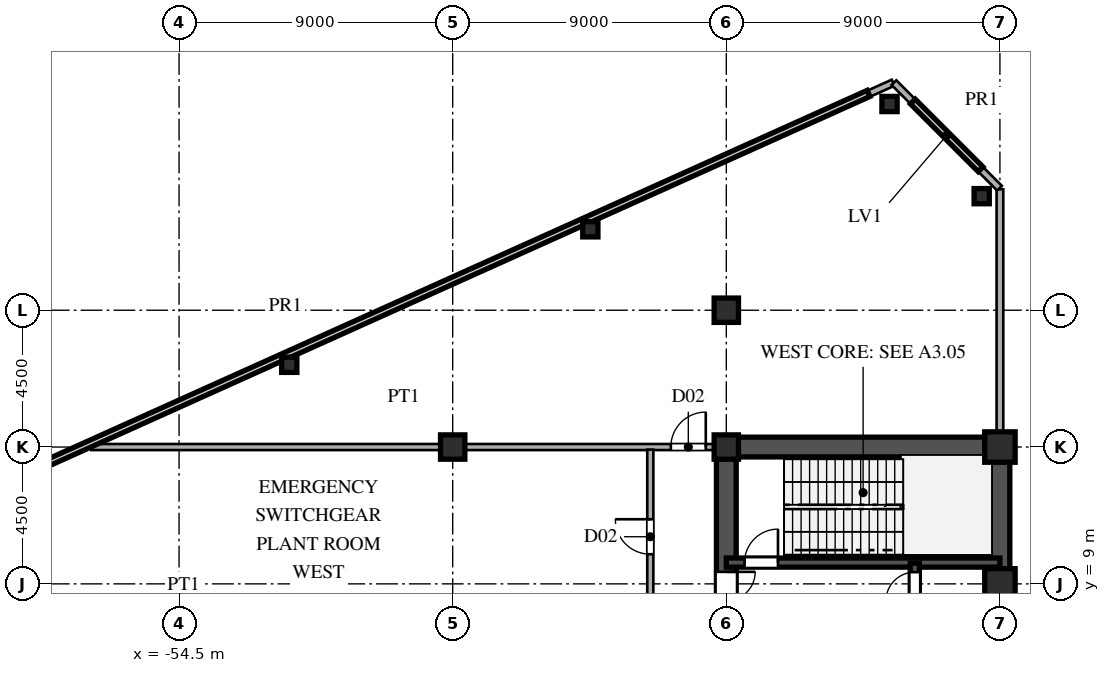
"""IFC4 building model, lengths in metres.
Left out: names, types, materials, properties, quantities, classifications, styles, units other than length and angle.
Written with IfcOpenShell. Run it as: python <this file> out.ifc"""

import sys

from ifc_helpers import new_model, si_unit, direction, frame, frame_2d, origin, origin_2d, place, context, subcontext, project, spatial, rectangle, hollow_rectangle, i_section, extrude, source, transform, mapped, element, fill, save


model = new_model("IFC4")
c1 = context("Model", 3, precision=1e-05, world=origin(), true_north=direction((0.0, 1.0)))
c2 = subcontext(c1, "Body", "Model", "MODEL_VIEW")
j1 = project(units=[si_unit("LENGTHUNIT", "METRE"), si_unit("PLANEANGLEUNIT", "RADIAN")], contexts=[c1])
p1 = place(None, origin())
s1 = spatial("IfcSite", under=j1, at=p1, CompositionType="ELEMENT")
p2 = place(p1, origin())
s2 = spatial("IfcBuilding", under=s1, at=p2, CompositionType="ELEMENT")
p3 = place(p2, frame((0.0, 0.0, 87.3)))
s3 = spatial("IfcBuildingStorey", under=s2, at=p3, CompositionType="ELEMENT", Elevation=87.3)
m1 = source(origin(), c2, "Body", "SweptSolid", [
    extrude(hollow_rectangle(XDim=1.0, YDim=1.0, WallThickness=0.042, at=origin_2d()), origin(), (0.0, 0.0, 1.0), 5.1),
])
for number, where, z_axis, x_axis in (
    (1, (-27.5, 9.0, 0.0), (0.0, 0.0, 1.0), (1.0, 0.0, 0.0)),
    (2, (-27.5, 13.5, 0.0), (0.0, 0.0, 1.0), (1.0, 0.0, 0.0)),
):
    element("IfcColumn", number, at=place(p3, frame(where, z_axis=z_axis, x_axis=x_axis)), inside=s3, PredefinedType="COLUMN", context=c2, shape_type="MappedRepresentation", body=[
        mapped(m1, transform((0.0, 0.0, 0.0), scale=1.0)),
    ])
m2 = source(origin(), c2, "Body", "SweptSolid", [
    extrude(i_section(OverallWidth=0.8, OverallDepth=0.8, WebThickness=0.032, FlangeThickness=0.05, at=origin_2d()), origin(), (0.0, 0.0, 1.0), 5.1),
])
for number, where, z_axis, x_axis in (
    (3, (-36.5, 13.5, 0.0), (0.0, 0.0, 1.0), (1.0, 0.0, 0.0)),
    (4, (-36.5, 18.0, 0.0), (0.0, 0.0, 1.0), (1.0, 0.0, 0.0)),
    (5, (-45.5, 13.5, 0.0), (0.0, 0.0, 1.0), (1.0, 0.0, 0.0)),
):
    element("IfcColumn", number, at=place(p3, frame(where, z_axis=z_axis, x_axis=x_axis)), inside=s3, PredefinedType="COLUMN", context=c2, shape_type="MappedRepresentation", body=[
        mapped(m2, transform((0.0, 0.0, 0.0), scale=1.0)),
    ])
m3 = source(origin(), c2, "Body", "SweptSolid", [
    extrude(hollow_rectangle(XDim=0.5, YDim=0.5, WallThickness=0.02, at=origin_2d()), origin(), (0.0, 0.0, 1.0), 5.1),
])
for number, where, z_axis, x_axis in (
    (6, (-28.1, 21.751, 0.0), (0.0, 0.0, 1.0), (1.0, 0.0, 0.0)),
    (7, (-31.131, 24.783, 0.0), (0.0, 0.0, 1.0), (1.0, 0.0, 0.0)),
    (8, (-40.973, 20.661, 0.0), (0.0, 0.0, 1.0), (1.0, 0.0, 0.0)),
    (9, (-50.875, 16.205, 0.0), (0.0, 0.0, 1.0), (1.0, 0.0, 0.0)),
):
    element("IfcColumn", number, at=place(p3, frame(where, z_axis=z_axis, x_axis=x_axis)), inside=s3, PredefinedType="COLUMN", context=c2, shape_type="MappedRepresentation", body=[
        mapped(m3, transform((0.0, 0.0, 0.0), scale=1.0)),
    ])
p4 = place(p3, frame((-27.5, 13.52, 0.0), z_axis=(0.0, 0.0, 1.0), x_axis=(0.0, 1.0, 0.0)))
e10 = element("IfcWall", 10, at=p4, inside=s3, PredefinedType="PARAPET", context=c2, shape_type="SweptSolid", body=[
    extrude(rectangle(XDim=8.46, YDim=0.22, at=frame_2d((4.23, 0.0))), origin(), (0.0, 0.0, 1.0), 1.25),
])
p5 = place(p3, frame((-27.514, 22.014, 0.0), z_axis=(0.0, 0.0, 1.0), x_axis=(-0.707106781187, 0.707106781187, 0.0)))
e11 = element("IfcWall", 11, at=p5, inside=s3, PredefinedType="PARAPET", context=c2, shape_type="SweptSolid", body=[
    extrude(rectangle(XDim=4.91, YDim=0.22, at=frame_2d((2.455, 0.0))), origin(), (0.0, 0.0, 1.0), 1.25),
])
p6 = place(p3, frame((-31.018, 25.492, 0.0), z_axis=(0.0, 0.0, 1.0), x_axis=(-0.911922547569, -0.410362360889, 0.0)))
e12 = element("IfcWall", 12, at=p6, inside=s3, PredefinedType="PARAPET", context=c2, shape_type="SweptSolid", body=[
    extrude(rectangle(XDim=43.823, YDim=0.22, at=frame_2d((21.912, 0.0))), origin(), (0.0, 0.0, 1.0), 1.25),
])
p7 = place(p3, frame((-27.5, 1.3, 0.0), z_axis=(0.0, 0.0, 1.0), x_axis=(0.0, 1.0, 0.0)))
e13 = element("IfcWall", 13, at=p7, inside=s3, PredefinedType="SHEAR", context=c2, shape_type="SweptSolid", body=[
    extrude(rectangle(XDim=12.2, YDim=0.65, at=frame_2d((6.1, 0.0))), origin(), (0.0, 0.0, 1.0), 4.88),
])
p8 = place(p3, frame((-36.5, 13.5, 0.0), z_axis=(0.0, 0.0, 1.0), x_axis=(1.0, 0.0, 0.0)))
e14 = element("IfcWall", 14, at=p8, inside=s3, PredefinedType="SHEAR", context=c2, shape_type="SweptSolid", body=[
    extrude(rectangle(XDim=9.0, YDim=0.65, at=frame_2d((4.5, 0.0))), origin(), (0.0, 0.0, 1.0), 4.88),
])
p9 = place(p3, frame((-36.5, 8.2, 0.0), z_axis=(0.0, 0.0, 1.0), x_axis=(0.0, 1.0, 0.0)))
e15 = element("IfcWall", 15, at=p9, inside=s3, PredefinedType="SHEAR", context=c2, shape_type="SweptSolid", body=[
    extrude(rectangle(XDim=5.45, YDim=0.65, at=frame_2d((2.725, 0.0))), origin(), (0.0, 0.0, 1.0), 4.88),
])
p10 = place(p9, frame((0.245, 0.0, 0.0)))
e16 = element("IfcOpeningElement", 16, at=p10, cuts=e15, PredefinedType="OPENING", context=c2, shape_type="SweptSolid", body=[
    extrude(rectangle(XDim=0.95, YDim=2.15, at=frame_2d((0.475, 1.075))), frame((0.0, 0.335, 0.0), z_axis=(0.0, -1.0, 0.0), x_axis=(1.0, 0.0, 0.0)), (0.0, 0.0, 1.0), 0.67),
])
p11 = place(p3, frame((-36.5, 9.7, 0.0), z_axis=(0.0, 0.0, 1.0), x_axis=(1.0, 0.0, 0.0)))
e17 = element("IfcWall", 17, at=p11, inside=s3, PredefinedType="SHEAR", context=c2, shape_type="SweptSolid", body=[
    extrude(rectangle(XDim=9.0, YDim=0.3, at=frame_2d((4.5, 0.0))), origin(), (0.0, 0.0, 1.0), 4.88),
])
p12 = place(p11, frame((0.6, 0.0, 0.0)))
e18 = element("IfcOpeningElement", 18, at=p12, cuts=e17, PredefinedType="OPENING", context=c2, shape_type="SweptSolid", body=[
    extrude(rectangle(XDim=1.1, YDim=2.2, at=frame_2d((0.55, 1.1))), frame((0.0, 0.16, 0.0), z_axis=(0.0, -1.0, 0.0), x_axis=(1.0, 0.0, 0.0)), (0.0, 0.0, 1.0), 0.32),
])
p13 = place(p3, frame((-30.3, 8.15, 0.0), z_axis=(0.0, 0.0, 1.0), x_axis=(0.0, 1.0, 0.0)))
e19 = element("IfcWall", 19, at=p13, inside=s3, PredefinedType="SHEAR", context=c2, shape_type="SweptSolid", body=[
    extrude(rectangle(XDim=1.53, YDim=0.3, at=frame_2d((0.765, 0.0))), origin(), (0.0, 0.0, 1.0), 4.88),
])
p14 = place(p13, frame((0.285, 0.0, 0.0)))
e20 = element("IfcOpeningElement", 20, at=p14, cuts=e19, PredefinedType="OPENING", context=c2, shape_type="SweptSolid", body=[
    extrude(rectangle(XDim=0.95, YDim=2.15, at=frame_2d((0.475, 1.075))), frame((0.0, 0.16, 0.0), z_axis=(0.0, -1.0, 0.0), x_axis=(1.0, 0.0, 0.0)), (0.0, 0.0, 1.0), 0.32),
])
p15 = place(p3, frame((-57.386, 13.5, 0.0), z_axis=(0.0, 0.0, 1.0), x_axis=(1.0, 0.0, 0.0)))
e21 = element("IfcWall", 21, at=p15, inside=s3, PredefinedType="PARTITIONING", context=c2, shape_type="SweptSolid", body=[
    extrude(rectangle(XDim=11.866, YDim=0.2, at=frame_2d((5.933, 0.0))), origin(), (0.0, 0.0, 1.0), 4.88),
])
p16 = place(p3, frame((-45.52, 13.5, 0.0), z_axis=(0.0, 0.0, 1.0), x_axis=(1.0, 0.0, 0.0)))
e22 = element("IfcWall", 22, at=p16, inside=s3, PredefinedType="PARTITIONING", context=c2, shape_type="SweptSolid", body=[
    extrude(rectangle(XDim=8.69, YDim=0.2, at=frame_2d((4.345, 0.0))), origin(), (0.0, 0.0, 1.0), 4.18),
])
p17 = place(p16, frame((7.195, 0.0, 0.0)))
e23 = element("IfcOpeningElement", 23, at=p17, cuts=e22, PredefinedType="OPENING", context=c2, shape_type="SweptSolid", body=[
    extrude(rectangle(XDim=1.15, YDim=2.2, at=frame_2d((0.575, 1.1))), frame((0.0, 0.11, 0.0), z_axis=(0.0, -1.0, 0.0), x_axis=(1.0, 0.0, 0.0)), (0.0, 0.0, 1.0), 0.22),
])
p18 = place(p3, frame((-39.0, -13.415, 0.0), z_axis=(0.0, 0.0, 1.0), x_axis=(0.0, 1.0, 0.0)))
e24 = element("IfcWall", 24, at=p18, inside=s3, PredefinedType="PARTITIONING", context=c2, shape_type="SweptSolid", body=[
    extrude(rectangle(XDim=26.83, YDim=0.2, at=frame_2d((13.415, 0.0))), origin(), (0.0, 0.0, 1.0), 4.88),
])
p19 = place(p18, frame((4.04, 0.0, 0.0)))
e25 = element("IfcOpeningElement", 25, at=p19, cuts=e24, PredefinedType="OPENING", context=c2, shape_type="SweptSolid", body=[
    extrude(rectangle(XDim=1.15, YDim=2.2, at=frame_2d((0.575, 1.1))), frame((0.0, 0.11, 0.0), z_axis=(0.0, -1.0, 0.0), x_axis=(1.0, 0.0, 0.0)), (0.0, 0.0, 1.0), 0.22),
])
p20 = place(p18, frame((11.34, 0.0, 0.0)))
e26 = element("IfcOpeningElement", 26, at=p20, cuts=e24, PredefinedType="OPENING", context=c2, shape_type="SweptSolid", body=[
    extrude(rectangle(XDim=1.15, YDim=2.2, at=frame_2d((0.575, 1.1))), frame((0.0, 0.11, 0.0), z_axis=(0.0, -1.0, 0.0), x_axis=(1.0, 0.0, 0.0)), (0.0, 0.0, 1.0), 0.22),
])
p21 = place(p18, frame((17.59, 0.0, 0.0)))
e27 = element("IfcOpeningElement", 27, at=p21, cuts=e24, PredefinedType="OPENING", context=c2, shape_type="SweptSolid", body=[
    extrude(rectangle(XDim=1.15, YDim=2.2, at=frame_2d((0.575, 1.1))), frame((0.0, 0.11, 0.0), z_axis=(0.0, -1.0, 0.0), x_axis=(1.0, 0.0, 0.0)), (0.0, 0.0, 1.0), 0.22),
])
p22 = place(p18, frame((23.39, 0.0, 0.0)))
e28 = element("IfcOpeningElement", 28, at=p22, cuts=e24, PredefinedType="OPENING", context=c2, shape_type="SweptSolid", body=[
    extrude(rectangle(XDim=1.15, YDim=2.2, at=frame_2d((0.575, 1.1))), frame((0.0, 0.11, 0.0), z_axis=(0.0, -1.0, 0.0), x_axis=(1.0, 0.0, 0.0)), (0.0, 0.0, 1.0), 0.22),
])
m4 = source(origin(), c2, "Body", "SweptSolid", [
    extrude(rectangle(XDim=0.95, YDim=2.15, at=frame_2d((0.475, 1.075))), frame((0.0, 0.025, 0.0), z_axis=(0.0, -1.0, 0.0), x_axis=(1.0, 0.0, 0.0)), (0.0, 0.0, 1.0), 0.05),
])
p23 = place(p10, frame((0.95, 0.0, 0.0), z_axis=(0.0, 0.0, 1.0), x_axis=(-1.0, 0.0, 0.0)))
e29 = element("IfcDoor", 29, at=p23, inside=s3, OperationType="SINGLE_SWING_RIGHT", PredefinedType="DOOR", context=c2, shape_type="MappedRepresentation", body=[
    mapped(m4, transform((0.0, 0.0, 0.0), scale=1.0)),
])
fill(e16, e29)
m5 = source(origin(), c2, "Body", "SweptSolid", [
    extrude(rectangle(XDim=1.1, YDim=2.2, at=frame_2d((0.55, 1.1))), frame((0.0, 0.025, 0.0), z_axis=(0.0, -1.0, 0.0), x_axis=(1.0, 0.0, 0.0)), (0.0, 0.0, 1.0), 0.05),
])
p24 = place(p12, origin())
e30 = element("IfcDoor", 30, at=p24, inside=s3, OperationType="SINGLE_SWING_RIGHT", PredefinedType="DOOR", context=c2, shape_type="MappedRepresentation", body=[
    mapped(m5, transform((0.0, 0.0, 0.0), scale=1.0)),
])
fill(e18, e30)
p25 = place(p14, origin())
e31 = element("IfcDoor", 31, at=p25, inside=s3, OperationType="SINGLE_SWING_LEFT", PredefinedType="DOOR", context=c2, shape_type="MappedRepresentation", body=[
    mapped(m4, transform((0.0, 0.0, 0.0), scale=1.0)),
])
fill(e20, e31)
m6 = source(origin(), c2, "Body", "SweptSolid", [
    extrude(rectangle(XDim=1.15, YDim=2.2, at=frame_2d((0.575, 1.1))), frame((0.0, 0.025, 0.0), z_axis=(0.0, -1.0, 0.0), x_axis=(1.0, 0.0, 0.0)), (0.0, 0.0, 1.0), 0.05),
])
p26 = place(p17, origin())
e32 = element("IfcDoor", 32, at=p26, inside=s3, OperationType="SINGLE_SWING_RIGHT", PredefinedType="DOOR", context=c2, shape_type="MappedRepresentation", body=[
    mapped(m6, transform((0.0, 0.0, 0.0), scale=1.0)),
])
fill(e23, e32)
p27 = place(p22, origin())
e33 = element("IfcDoor", 33, at=p27, inside=s3, OperationType="SINGLE_SWING_RIGHT", PredefinedType="DOOR", context=c2, shape_type="MappedRepresentation", body=[
    mapped(m6, transform((0.0, 0.0, 0.0), scale=1.0)),
])
fill(e28, e33)
save(model, sys.argv[1])
